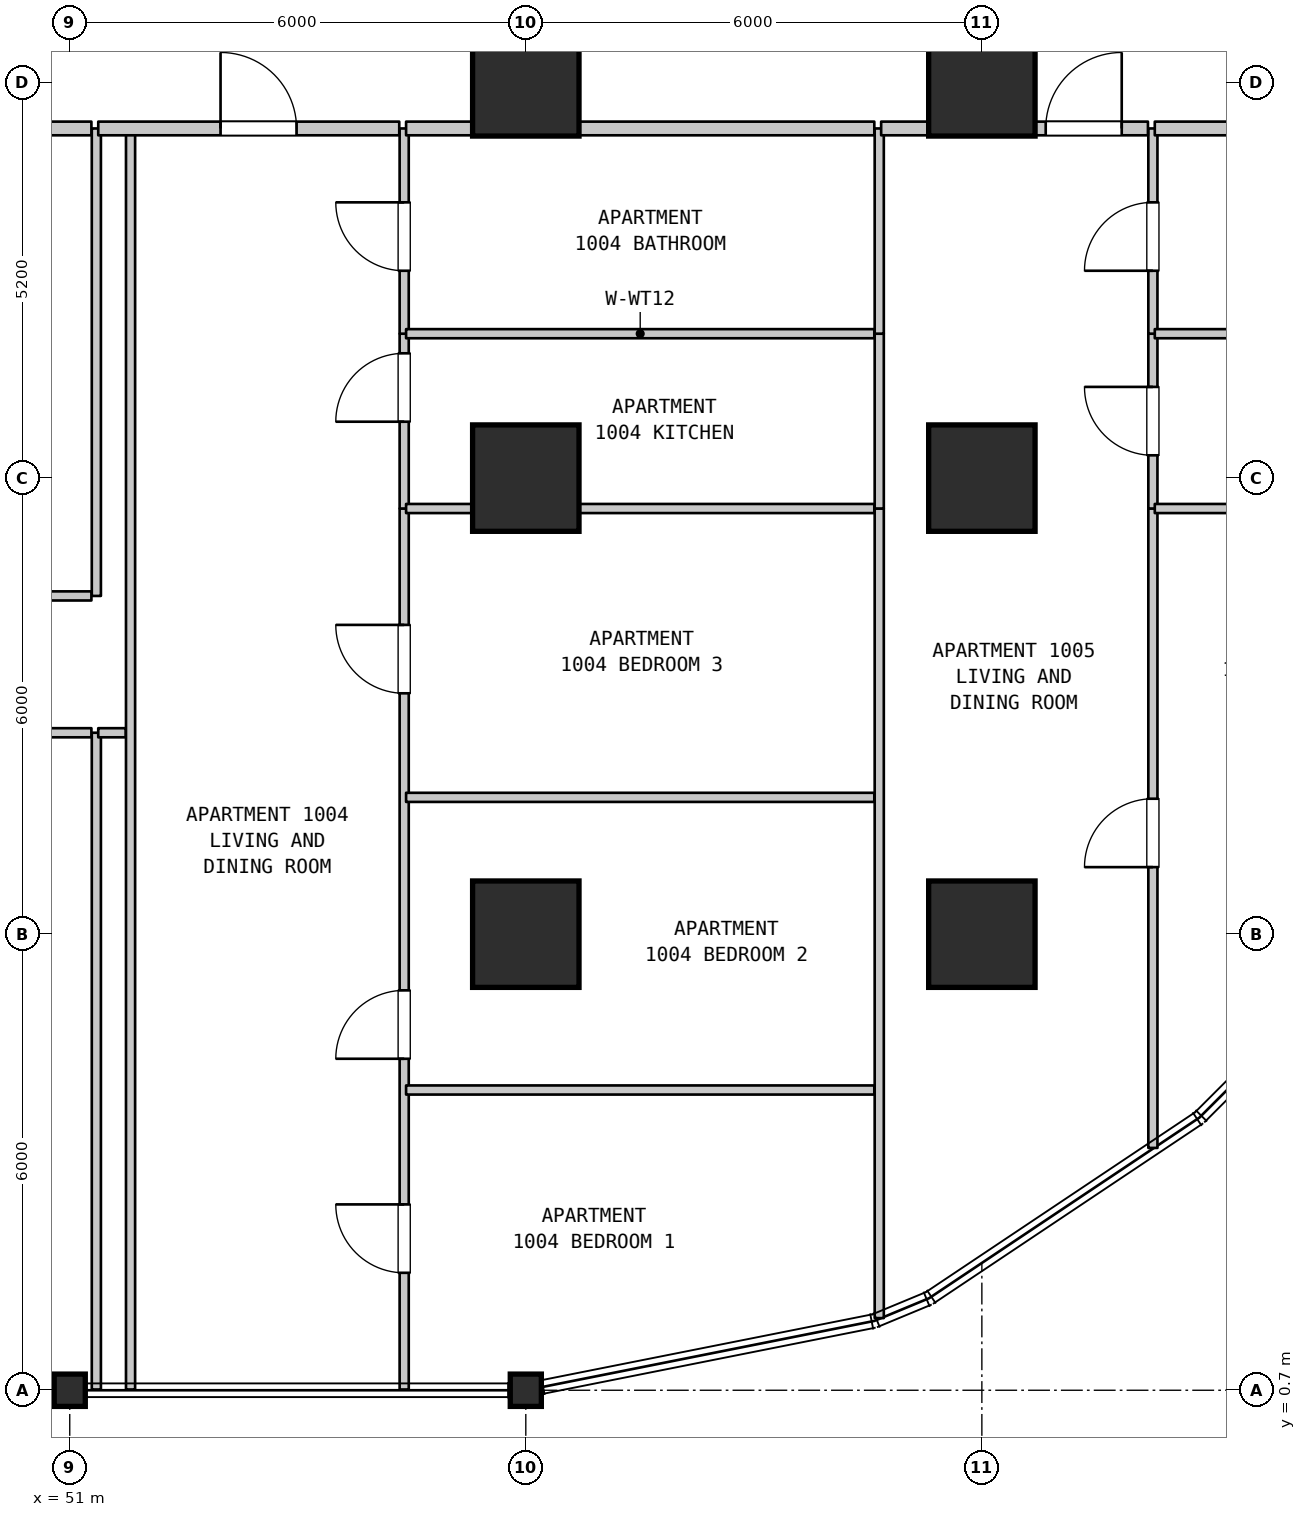
"""IFC4 building model, lengths in metres.
Left out: names, types, materials, properties, quantities, classifications, styles, units other than length and angle.
Written with IfcOpenShell. Run it as: python <this file> out.ifc"""

import sys

from ifc_helpers import new_model, si_unit, direction, frame, frame_2d, origin, origin_2d, place, context, subcontext, project, spatial, rectangle, i_section, extrude, element, fill, save


model = new_model("IFC4")
c1 = context("Model", 3, precision=1e-05, world=origin(), true_north=direction((0.0, 1.0)))
c2 = subcontext(c1, "Body", "Model", "MODEL_VIEW")
j1 = project(units=[si_unit("LENGTHUNIT", "METRE"), si_unit("PLANEANGLEUNIT", "RADIAN")], contexts=[c1])
p1 = place(None, origin())
s1 = spatial("IfcSite", under=j1, at=p1, CompositionType="ELEMENT")
p2 = place(p1, origin())
s2 = spatial("IfcBuilding", under=s1, at=p2, CompositionType="ELEMENT")
p3 = place(p2, frame((0.0, 0.0, 46.2)))
s3 = spatial("IfcBuildingStorey", under=s2, at=p3, CompositionType="ELEMENT", Elevation=46.2)
for number, where, z_axis, x_axis in (
    (1, (51.0, 0.7, 0.0), (0.0, 0.0, 1.0), (1.0, 0.0, 0.0)),
    (2, (57.0, 0.7, 0.0), (0.0, 0.0, 1.0), (1.0, 0.0, 0.0)),
):
    element("IfcColumn", number, at=place(p3, frame(where, z_axis=z_axis, x_axis=x_axis)), inside=s3, PredefinedType="COLUMN", context=c2, shape_type="SweptSolid", body=[
        extrude(i_section(OverallWidth=0.409, OverallDepth=0.425, WebThickness=0.032, FlangeThickness=0.052, FilletRadius=0.015, at=origin_2d()), origin(), (0.0, 0.0, 1.0), 3.7),
    ])
for number, where, z_axis, x_axis in (
    (3, (57.0, 6.7, 0.0), (0.0, 0.0, 1.0), (1.0, 0.0, 0.0)),
    (4, (57.0, 12.7, 0.0), (0.0, 0.0, 1.0), (1.0, 0.0, 0.0)),
    (5, (57.0, 17.9, 0.0), (0.0, 0.0, 1.0), (1.0, 0.0, 0.0)),
    (6, (63.0, 6.7, 0.0), (0.0, 0.0, 1.0), (1.0, 0.0, 0.0)),
    (7, (63.0, 12.7, 0.0), (0.0, 0.0, 1.0), (1.0, 0.0, 0.0)),
    (8, (63.0, 17.9, 0.0), (0.0, 0.0, 1.0), (1.0, 0.0, 0.0)),
):
    element("IfcColumn", number, at=place(p3, frame(where, z_axis=z_axis, x_axis=x_axis)), inside=s3, PredefinedType="COLUMN", context=c2, shape_type="SweptSolid", body=[
        extrude(rectangle(XDim=1.4, YDim=1.4, at=origin_2d()), origin(), (0.0, 0.0, 1.0), 3.7),
    ])
p4 = place(p3, frame((51.35, 0.71, 0.0), z_axis=(0.0, 0.0, 1.0), x_axis=(0.0, 1.0, 0.0)))
e9 = element("IfcWall", 9, at=p4, inside=s3, PredefinedType="PARTITIONING", context=c2, shape_type="SweptSolid", body=[
    extrude(rectangle(XDim=8.64, YDim=0.12, at=frame_2d((4.32, 0.0))), origin(), (0.0, 0.0, 1.0), 3.385),
])
p5 = place(p3, frame((51.35, 11.15, 0.0), z_axis=(0.0, 0.0, 1.0), x_axis=(0.0, 1.0, 0.0)))
e10 = element("IfcWall", 10, at=p5, inside=s3, PredefinedType="PARTITIONING", context=c2, shape_type="SweptSolid", body=[
    extrude(rectangle(XDim=6.15, YDim=0.12, at=frame_2d((3.075, 0.0))), origin(), (0.0, 0.0, 1.0), 3.385),
])
p6 = place(p3, frame((51.8, 0.71, 0.0), z_axis=(0.0, 0.0, 1.0), x_axis=(0.0, 1.0, 0.0)))
e11 = element("IfcWall", 11, at=p6, inside=s3, PredefinedType="PARTITIONING", context=c2, shape_type="SweptSolid", body=[
    extrude(rectangle(XDim=16.59, YDim=0.12, at=frame_2d((8.295, 0.0))), origin(), (0.0, 0.0, 1.0), 3.385),
])
p7 = place(p3, frame((55.4, 0.71, 0.0), z_axis=(0.0, 0.0, 1.0), x_axis=(0.0, 1.0, 0.0)))
e12 = element("IfcWall", 12, at=p7, inside=s3, PredefinedType="PARTITIONING", context=c2, shape_type="SweptSolid", body=[
    extrude(rectangle(XDim=11.59, YDim=0.12, at=frame_2d((5.795, 0.0))), origin(), (0.0, 0.0, 1.0), 3.385),
])
p8 = place(p7, frame((1.535, 0.0, 0.0)))
e13 = element("IfcOpeningElement", 13, at=p8, cuts=e12, PredefinedType="OPENING", context=c2, shape_type="SweptSolid", body=[
    extrude(rectangle(XDim=0.9, YDim=2.15, at=frame_2d((0.45, 1.075))), frame((0.0, 0.07, 0.0), z_axis=(0.0, -1.0, 0.0), x_axis=(1.0, 0.0, 0.0)), (0.0, 0.0, 1.0), 0.14),
])
p9 = place(p7, frame((4.351, 0.0, 0.0)))
e14 = element("IfcOpeningElement", 14, at=p9, cuts=e12, PredefinedType="OPENING", context=c2, shape_type="SweptSolid", body=[
    extrude(rectangle(XDim=0.9, YDim=2.15, at=frame_2d((0.45, 1.075))), frame((0.0, 0.07, 0.0), z_axis=(0.0, -1.0, 0.0), x_axis=(1.0, 0.0, 0.0)), (0.0, 0.0, 1.0), 0.14),
])
p10 = place(p7, frame((9.159, 0.0, 0.0)))
e15 = element("IfcOpeningElement", 15, at=p10, cuts=e12, PredefinedType="OPENING", context=c2, shape_type="SweptSolid", body=[
    extrude(rectangle(XDim=0.9, YDim=2.15, at=frame_2d((0.45, 1.075))), frame((0.0, 0.07, 0.0), z_axis=(0.0, -1.0, 0.0), x_axis=(1.0, 0.0, 0.0)), (0.0, 0.0, 1.0), 0.14),
])
p11 = place(p3, frame((55.4, 12.3, 0.0), z_axis=(0.0, 0.0, 1.0), x_axis=(0.0, 1.0, 0.0)))
e16 = element("IfcWall", 16, at=p11, inside=s3, PredefinedType="PARTITIONING", context=c2, shape_type="SweptSolid", body=[
    extrude(rectangle(XDim=2.3, YDim=0.12, at=frame_2d((1.15, 0.0))), origin(), (0.0, 0.0, 1.0), 3.385),
])
p12 = place(p11, frame((1.142, 0.0, 0.0)))
e17 = element("IfcOpeningElement", 17, at=p12, cuts=e16, PredefinedType="OPENING", context=c2, shape_type="SweptSolid", body=[
    extrude(rectangle(XDim=0.9, YDim=2.15, at=frame_2d((0.45, 1.075))), frame((0.0, 0.07, 0.0), z_axis=(0.0, -1.0, 0.0), x_axis=(1.0, 0.0, 0.0)), (0.0, 0.0, 1.0), 0.14),
])
p13 = place(p3, frame((55.4, 14.6, 0.0), z_axis=(0.0, 0.0, 1.0), x_axis=(0.0, 1.0, 0.0)))
e18 = element("IfcWall", 18, at=p13, inside=s3, PredefinedType="PARTITIONING", context=c2, shape_type="SweptSolid", body=[
    extrude(rectangle(XDim=2.7, YDim=0.12, at=frame_2d((1.35, 0.0))), origin(), (0.0, 0.0, 1.0), 3.385),
])
p14 = place(p13, frame((0.828, 0.0, 0.0)))
e19 = element("IfcOpeningElement", 19, at=p14, cuts=e18, PredefinedType="OPENING", context=c2, shape_type="SweptSolid", body=[
    extrude(rectangle(XDim=0.9, YDim=2.1, at=frame_2d((0.45, 1.05))), frame((0.0, 0.07, 0.0), z_axis=(0.0, -1.0, 0.0), x_axis=(1.0, 0.0, 0.0)), (0.0, 0.0, 1.0), 0.14),
])
p15 = place(p3, frame((61.65, 1.649, 0.0), z_axis=(0.0, 0.0, 1.0), x_axis=(0.0, 1.0, 0.0)))
e20 = element("IfcWall", 20, at=p15, inside=s3, PredefinedType="PARTITIONING", context=c2, shape_type="SweptSolid", body=[
    extrude(rectangle(XDim=10.651, YDim=0.12, at=frame_2d((5.326, 0.0))), origin(), (0.0, 0.0, 1.0), 3.385),
])
p16 = place(p3, frame((61.65, 12.3, 0.0), z_axis=(0.0, 0.0, 1.0), x_axis=(0.0, 1.0, 0.0)))
e21 = element("IfcWall", 21, at=p16, inside=s3, PredefinedType="PARTITIONING", context=c2, shape_type="SweptSolid", body=[
    extrude(rectangle(XDim=2.3, YDim=0.12, at=frame_2d((1.15, 0.0))), origin(), (0.0, 0.0, 1.0), 3.385),
])
p17 = place(p3, frame((61.65, 14.6, 0.0), z_axis=(0.0, 0.0, 1.0), x_axis=(0.0, 1.0, 0.0)))
e22 = element("IfcWall", 22, at=p17, inside=s3, PredefinedType="PARTITIONING", context=c2, shape_type="SweptSolid", body=[
    extrude(rectangle(XDim=2.7, YDim=0.12, at=frame_2d((1.35, 0.0))), origin(), (0.0, 0.0, 1.0), 3.385),
])
p18 = place(p3, frame((65.25, 3.888, 0.0), z_axis=(0.0, 0.0, 1.0), x_axis=(0.0, 1.0, 0.0)))
e23 = element("IfcWall", 23, at=p18, inside=s3, PredefinedType="PARTITIONING", context=c2, shape_type="SweptSolid", body=[
    extrude(rectangle(XDim=8.412, YDim=0.12, at=frame_2d((4.206, 0.0))), origin(), (0.0, 0.0, 1.0), 3.385),
])
p19 = place(p18, frame((3.694, 0.0, 0.0)))
e24 = element("IfcOpeningElement", 24, at=p19, cuts=e23, PredefinedType="OPENING", context=c2, shape_type="SweptSolid", body=[
    extrude(rectangle(XDim=0.9, YDim=2.15, at=frame_2d((0.45, 1.075))), frame((0.0, 0.07, 0.0), z_axis=(0.0, -1.0, 0.0), x_axis=(1.0, 0.0, 0.0)), (0.0, 0.0, 1.0), 0.14),
])
p20 = place(p3, frame((65.25, 12.3, 0.0), z_axis=(0.0, 0.0, 1.0), x_axis=(0.0, 1.0, 0.0)))
e25 = element("IfcWall", 25, at=p20, inside=s3, PredefinedType="PARTITIONING", context=c2, shape_type="SweptSolid", body=[
    extrude(rectangle(XDim=2.3, YDim=0.12, at=frame_2d((1.15, 0.0))), origin(), (0.0, 0.0, 1.0), 3.385),
])
p21 = place(p20, frame((0.7, 0.0, 0.0)))
e26 = element("IfcOpeningElement", 26, at=p21, cuts=e25, PredefinedType="OPENING", context=c2, shape_type="SweptSolid", body=[
    extrude(rectangle(XDim=0.9, YDim=2.15, at=frame_2d((0.45, 1.075))), frame((0.0, 0.07, 0.0), z_axis=(0.0, -1.0, 0.0), x_axis=(1.0, 0.0, 0.0)), (0.0, 0.0, 1.0), 0.14),
])
p22 = place(p3, frame((65.25, 14.6, 0.0), z_axis=(0.0, 0.0, 1.0), x_axis=(0.0, 1.0, 0.0)))
e27 = element("IfcWall", 27, at=p22, inside=s3, PredefinedType="PARTITIONING", context=c2, shape_type="SweptSolid", body=[
    extrude(rectangle(XDim=2.7, YDim=0.12, at=frame_2d((1.35, 0.0))), origin(), (0.0, 0.0, 1.0), 3.385),
])
p23 = place(p22, frame((0.828, 0.0, 0.0)))
e28 = element("IfcOpeningElement", 28, at=p23, cuts=e27, PredefinedType="OPENING", context=c2, shape_type="SweptSolid", body=[
    extrude(rectangle(XDim=0.9, YDim=2.1, at=frame_2d((0.45, 1.05))), frame((0.0, 0.07, 0.0), z_axis=(0.0, -1.0, 0.0), x_axis=(1.0, 0.0, 0.0)), (0.0, 0.0, 1.0), 0.14),
])
for number, where, z_axis, x_axis in (
    (29, (55.425, 4.65, 0.0), (0.0, 0.0, 1.0), (1.0, 0.0, 0.0)),
    (30, (55.425, 8.5, 0.0), (0.0, 0.0, 1.0), (1.0, 0.0, 0.0)),
):
    element("IfcWall", number, at=place(p3, frame(where, z_axis=z_axis, x_axis=x_axis)), inside=s3, PredefinedType="PARTITIONING", context=c2, shape_type="SweptSolid", body=[
        extrude(rectangle(XDim=6.16, YDim=0.12, at=frame_2d((3.08, 0.0))), origin(), (0.0, 0.0, 1.0), 3.385),
    ])
p24 = place(p3, frame((44.805, 9.35, 0.0), z_axis=(0.0, 0.0, 1.0), x_axis=(1.0, 0.0, 0.0)))
e31 = element("IfcWall", 31, at=p24, inside=s3, PredefinedType="PARTITIONING", context=c2, shape_type="SweptSolid", body=[
    extrude(rectangle(XDim=6.48, YDim=0.12, at=frame_2d((3.24, 0.0))), origin(), (0.0, 0.0, 1.0), 3.385),
])
p25 = place(p24, frame((1.252, 0.0, 0.0)))
e32 = element("IfcOpeningElement", 32, at=p25, cuts=e31, PredefinedType="OPENING", context=c2, shape_type="SweptSolid", body=[
    extrude(rectangle(XDim=0.9, YDim=2.15, at=frame_2d((0.45, 1.075))), frame((0.0, 0.07, 0.0), z_axis=(0.0, -1.0, 0.0), x_axis=(1.0, 0.0, 0.0)), (0.0, 0.0, 1.0), 0.14),
])
p26 = place(p24, frame((4.187, 0.0, 0.0)))
e33 = element("IfcOpeningElement", 33, at=p26, cuts=e31, PredefinedType="OPENING", context=c2, shape_type="SweptSolid", body=[
    extrude(rectangle(XDim=0.9, YDim=2.15, at=frame_2d((0.45, 1.075))), frame((0.0, 0.07, 0.0), z_axis=(0.0, -1.0, 0.0), x_axis=(1.0, 0.0, 0.0)), (0.0, 0.0, 1.0), 0.14),
])
p27 = place(p3, frame((51.375, 9.35, 0.0), z_axis=(0.0, 0.0, 1.0), x_axis=(1.0, 0.0, 0.0)))
e34 = element("IfcWall", 34, at=p27, inside=s3, PredefinedType="PARTITIONING", context=c2, shape_type="SweptSolid", body=[
    extrude(rectangle(XDim=0.36, YDim=0.12, at=frame_2d((0.18, 0.0))), origin(), (0.0, 0.0, 1.0), 3.385),
])
p28 = place(p3, frame((47.827, 11.15, 0.0), z_axis=(0.0, 0.0, 1.0), x_axis=(1.0, 0.0, 0.0)))
e35 = element("IfcWall", 35, at=p28, inside=s3, PredefinedType="PARTITIONING", context=c2, shape_type="SweptSolid", body=[
    extrude(rectangle(XDim=3.458, YDim=0.12, at=frame_2d((1.729, 0.0))), origin(), (0.0, 0.0, 1.0), 3.385),
])
p29 = place(p28, frame((1.208, 0.0, 0.0)))
e36 = element("IfcOpeningElement", 36, at=p29, cuts=e35, PredefinedType="OPENING", context=c2, shape_type="SweptSolid", body=[
    extrude(rectangle(XDim=0.9, YDim=2.1, at=frame_2d((0.45, 1.05))), frame((0.0, 0.07, 0.0), z_axis=(0.0, -1.0, 0.0), x_axis=(1.0, 0.0, 0.0)), (0.0, 0.0, 1.0), 0.14),
])
p30 = place(p3, frame((55.425, 12.3, 0.0), z_axis=(0.0, 0.0, 1.0), x_axis=(1.0, 0.0, 0.0)))
e37 = element("IfcWall", 37, at=p30, inside=s3, PredefinedType="PARTITIONING", context=c2, shape_type="SweptSolid", body=[
    extrude(rectangle(XDim=6.16, YDim=0.12, at=frame_2d((3.08, 0.0))), origin(), (0.0, 0.0, 1.0), 3.385),
])
p31 = place(p3, frame((65.275, 12.3, 0.0), z_axis=(0.0, 0.0, 1.0), x_axis=(1.0, 0.0, 0.0)))
e38 = element("IfcWall", 38, at=p31, inside=s3, PredefinedType="PARTITIONING", context=c2, shape_type="SweptSolid", body=[
    extrude(rectangle(XDim=4.437, YDim=0.12, at=frame_2d((2.219, 0.0))), origin(), (0.0, 0.0, 1.0), 3.385),
])
p32 = place(p3, frame((55.425, 14.6, 0.0), z_axis=(0.0, 0.0, 1.0), x_axis=(1.0, 0.0, 0.0)))
e39 = element("IfcWall", 39, at=p32, inside=s3, PredefinedType="PARTITIONING", context=c2, shape_type="SweptSolid", body=[
    extrude(rectangle(XDim=6.16, YDim=0.12, at=frame_2d((3.08, 0.0))), origin(), (0.0, 0.0, 1.0), 3.385),
])
p33 = place(p3, frame((65.275, 14.6, 0.0), z_axis=(0.0, 0.0, 1.0), x_axis=(1.0, 0.0, 0.0)))
e40 = element("IfcWall", 40, at=p33, inside=s3, PredefinedType="PARTITIONING", context=c2, shape_type="SweptSolid", body=[
    extrude(rectangle(XDim=4.715, YDim=0.12, at=frame_2d((2.357, 0.0))), origin(), (0.0, 0.0, 1.0), 3.385),
])
p34 = place(p3, frame((47.827, 17.3, 0.0), z_axis=(0.0, 0.0, 1.0), x_axis=(1.0, 0.0, 0.0)))
e41 = element("IfcWall", 41, at=p34, inside=s3, PredefinedType="STANDARD", context=c2, shape_type="SweptSolid", body=[
    extrude(rectangle(XDim=3.458, YDim=0.18, at=frame_2d((1.729, 0.0))), origin(), (0.0, 0.0, 1.0), 3.385),
])
p35 = place(p3, frame((51.375, 17.3, 0.0), z_axis=(0.0, 0.0, 1.0), x_axis=(1.0, 0.0, 0.0)))
e42 = element("IfcWall", 42, at=p35, inside=s3, PredefinedType="STANDARD", context=c2, shape_type="SweptSolid", body=[
    extrude(rectangle(XDim=3.96, YDim=0.18, at=frame_2d((1.98, 0.0))), origin(), (0.0, 0.0, 1.0), 3.385),
])
p36 = place(p35, frame((1.609, 0.0, 0.0)))
e43 = element("IfcOpeningElement", 43, at=p36, cuts=e42, PredefinedType="OPENING", context=c2, shape_type="SweptSolid", body=[
    extrude(rectangle(XDim=1.0, YDim=2.15, at=frame_2d((0.5, 1.075))), frame((0.0, 0.1, 0.0), z_axis=(0.0, -1.0, 0.0), x_axis=(1.0, 0.0, 0.0)), (0.0, 0.0, 1.0), 0.2),
])
p37 = place(p3, frame((55.425, 17.3, 0.0), z_axis=(0.0, 0.0, 1.0), x_axis=(1.0, 0.0, 0.0)))
e44 = element("IfcWall", 44, at=p37, inside=s3, PredefinedType="STANDARD", context=c2, shape_type="SweptSolid", body=[
    extrude(rectangle(XDim=6.16, YDim=0.18, at=frame_2d((3.08, 0.0))), origin(), (0.0, 0.0, 1.0), 3.385),
])
p38 = place(p3, frame((61.675, 17.3, 0.0), z_axis=(0.0, 0.0, 1.0), x_axis=(1.0, 0.0, 0.0)))
e45 = element("IfcWall", 45, at=p38, inside=s3, PredefinedType="STANDARD", context=c2, shape_type="SweptSolid", body=[
    extrude(rectangle(XDim=3.51, YDim=0.18, at=frame_2d((1.755, 0.0))), origin(), (0.0, 0.0, 1.0), 3.385),
])
p39 = place(p38, frame((2.165, 0.0, 0.0)))
e46 = element("IfcOpeningElement", 46, at=p39, cuts=e45, PredefinedType="OPENING", context=c2, shape_type="SweptSolid", body=[
    extrude(rectangle(XDim=1.0, YDim=2.15, at=frame_2d((0.5, 1.075))), frame((0.0, 0.1, 0.0), z_axis=(0.0, -1.0, 0.0), x_axis=(1.0, 0.0, 0.0)), (0.0, 0.0, 1.0), 0.2),
])
p40 = place(p3, frame((65.275, 17.3, 0.0), z_axis=(0.0, 0.0, 1.0), x_axis=(1.0, 0.0, 0.0)))
e47 = element("IfcWall", 47, at=p40, inside=s3, PredefinedType="STANDARD", context=c2, shape_type="SweptSolid", body=[
    extrude(rectangle(XDim=1.065, YDim=0.18, at=frame_2d((0.533, 0.0))), origin(), (0.0, 0.0, 1.0), 3.385),
])
p41 = place(p8, origin())
e48 = element("IfcDoor", 48, at=p41, inside=s3, OperationType="SINGLE_SWING_RIGHT", PredefinedType="DOOR", context=c2, shape_type="SweptSolid", body=[
    extrude(rectangle(XDim=0.9, YDim=2.15, at=frame_2d((0.45, 1.075))), frame((0.0, 0.025, 0.0), z_axis=(0.0, -1.0, 0.0), x_axis=(1.0, 0.0, 0.0)), (0.0, 0.0, 1.0), 0.05),
])
fill(e13, e48)
p42 = place(p9, origin())
e49 = element("IfcDoor", 49, at=p42, inside=s3, OperationType="SINGLE_SWING_LEFT", PredefinedType="DOOR", context=c2, shape_type="SweptSolid", body=[
    extrude(rectangle(XDim=0.9, YDim=2.15, at=frame_2d((0.45, 1.075))), frame((0.0, 0.025, 0.0), z_axis=(0.0, -1.0, 0.0), x_axis=(1.0, 0.0, 0.0)), (0.0, 0.0, 1.0), 0.05),
])
fill(e14, e49)
p43 = place(p10, origin())
e50 = element("IfcDoor", 50, at=p43, inside=s3, OperationType="SINGLE_SWING_RIGHT", PredefinedType="DOOR", context=c2, shape_type="SweptSolid", body=[
    extrude(rectangle(XDim=0.9, YDim=2.15, at=frame_2d((0.45, 1.075))), frame((0.0, 0.025, 0.0), z_axis=(0.0, -1.0, 0.0), x_axis=(1.0, 0.0, 0.0)), (0.0, 0.0, 1.0), 0.05),
])
fill(e15, e50)
p44 = place(p12, origin())
e51 = element("IfcDoor", 51, at=p44, inside=s3, OperationType="SINGLE_SWING_LEFT", PredefinedType="DOOR", context=c2, shape_type="SweptSolid", body=[
    extrude(rectangle(XDim=0.9, YDim=2.15, at=frame_2d((0.45, 1.075))), frame((0.0, 0.025, 0.0), z_axis=(0.0, -1.0, 0.0), x_axis=(1.0, 0.0, 0.0)), (0.0, 0.0, 1.0), 0.05),
])
fill(e17, e51)
p45 = place(p14, origin())
e52 = element("IfcDoor", 52, at=p45, inside=s3, OperationType="SINGLE_SWING_RIGHT", PredefinedType="DOOR", context=c2, shape_type="SweptSolid", body=[
    extrude(rectangle(XDim=0.9, YDim=2.1, at=frame_2d((0.45, 1.05))), frame((0.0, 0.025, 0.0), z_axis=(0.0, -1.0, 0.0), x_axis=(1.0, 0.0, 0.0)), (0.0, 0.0, 1.0), 0.05),
])
fill(e19, e52)
p46 = place(p19, origin())
e53 = element("IfcDoor", 53, at=p46, inside=s3, OperationType="SINGLE_SWING_LEFT", PredefinedType="DOOR", context=c2, shape_type="SweptSolid", body=[
    extrude(rectangle(XDim=0.9, YDim=2.15, at=frame_2d((0.45, 1.075))), frame((0.0, 0.025, 0.0), z_axis=(0.0, -1.0, 0.0), x_axis=(1.0, 0.0, 0.0)), (0.0, 0.0, 1.0), 0.05),
])
fill(e24, e53)
p47 = place(p21, origin())
e54 = element("IfcDoor", 54, at=p47, inside=s3, OperationType="SINGLE_SWING_RIGHT", PredefinedType="DOOR", context=c2, shape_type="SweptSolid", body=[
    extrude(rectangle(XDim=0.9, YDim=2.15, at=frame_2d((0.45, 1.075))), frame((0.0, 0.025, 0.0), z_axis=(0.0, -1.0, 0.0), x_axis=(1.0, 0.0, 0.0)), (0.0, 0.0, 1.0), 0.05),
])
fill(e26, e54)
p48 = place(p23, origin())
e55 = element("IfcDoor", 55, at=p48, inside=s3, OperationType="SINGLE_SWING_LEFT", PredefinedType="DOOR", context=c2, shape_type="SweptSolid", body=[
    extrude(rectangle(XDim=0.9, YDim=2.1, at=frame_2d((0.45, 1.05))), frame((0.0, 0.025, 0.0), z_axis=(0.0, -1.0, 0.0), x_axis=(1.0, 0.0, 0.0)), (0.0, 0.0, 1.0), 0.05),
])
fill(e28, e55)
p49 = place(p36, origin())
e56 = element("IfcDoor", 56, at=p49, inside=s3, OperationType="SINGLE_SWING_LEFT", PredefinedType="DOOR", context=c2, shape_type="SweptSolid", body=[
    extrude(rectangle(XDim=1.0, YDim=2.15, at=frame_2d((0.5, 1.075))), frame((0.0, 0.025, 0.0), z_axis=(0.0, -1.0, 0.0), x_axis=(1.0, 0.0, 0.0)), (0.0, 0.0, 1.0), 0.05),
])
fill(e43, e56)
p50 = place(p39, origin())
e57 = element("IfcDoor", 57, at=p50, inside=s3, OperationType="SINGLE_SWING_RIGHT", PredefinedType="DOOR", context=c2, shape_type="SweptSolid", body=[
    extrude(rectangle(XDim=1.0, YDim=2.15, at=frame_2d((0.5, 1.075))), frame((0.0, 0.025, 0.0), z_axis=(0.0, -1.0, 0.0), x_axis=(1.0, 0.0, 0.0)), (0.0, 0.0, 1.0), 0.05),
])
fill(e46, e57)
save(model, sys.argv[1])
